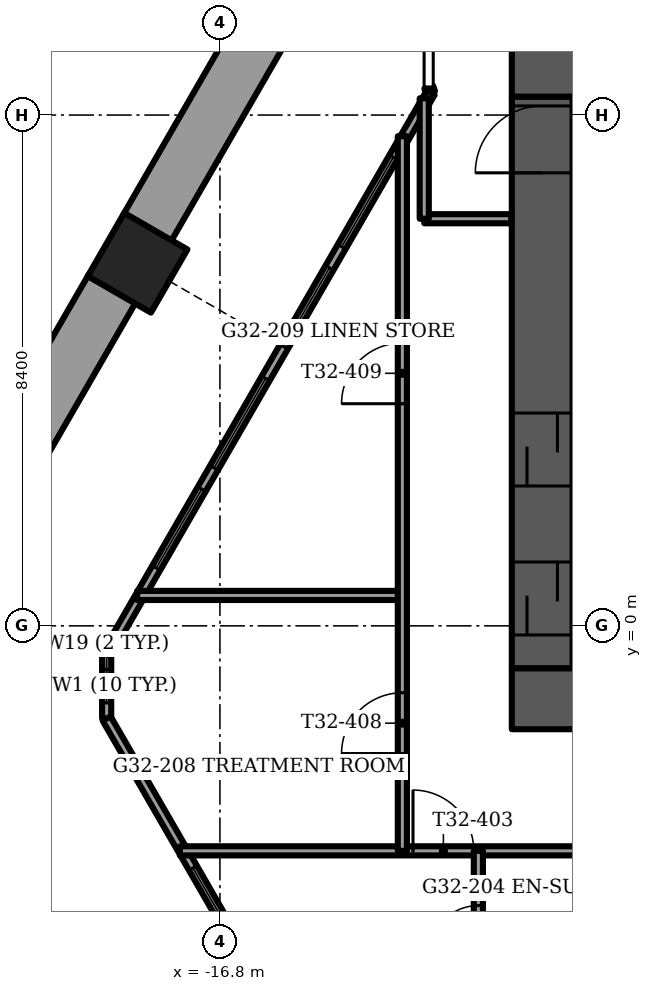
"""IFC4 building model, lengths in metres.
Left out: names, types, materials, properties, quantities, classifications, styles, units other than length and angle.
Written with IfcOpenShell. Run it as: python <this file> out.ifc"""

import sys

from ifc_helpers import new_model, si_unit, direction, frame, frame_2d, origin, origin_2d, place, context, subcontext, project, spatial, rectangle, extrude, element, fill, save


model = new_model("IFC4")
c1 = context("Model", 3, precision=1e-05, world=origin(), true_north=direction((0.0, 1.0)))
c2 = subcontext(c1, "Body", "Model", "MODEL_VIEW")
j1 = project(units=[si_unit("LENGTHUNIT", "METRE"), si_unit("PLANEANGLEUNIT", "RADIAN")], contexts=[c1])
p1 = place(None, origin())
s1 = spatial("IfcSite", under=j1, at=p1, CompositionType="ELEMENT")
p2 = place(p1, origin())
s2 = spatial("IfcBuilding", under=s1, at=p2, CompositionType="ELEMENT")
p3 = place(p2, frame((0.0, 0.0, 131.0)))
s3 = spatial("IfcBuildingStorey", under=s2, at=p3, CompositionType="ELEMENT", Elevation=131.0)
p4 = place(p3, frame((-18.154, 5.97, -1.2), z_axis=(0.0, 0.0, 1.0), x_axis=(0.5, 0.866025403784, 0.0)))
e1 = element("IfcColumn", 1, at=p4, inside=s3, PredefinedType="COLUMN", context=c2, shape_type="SweptSolid", body=[
    extrude(rectangle(XDim=1.2, YDim=1.2, at=origin_2d()), origin(), (0.0, 0.0, 1.0), 3.75),
])
p5 = place(p3, frame((-12.0, -1.2, -0.3), z_axis=(0.0, 0.0, 1.0), x_axis=(1.0, 0.0, 0.0)))
e2 = element("IfcWall", 2, at=p5, inside=s3, PredefinedType="SHEAR", context=c2, shape_type="SweptSolid", body=[
    extrude(rectangle(XDim=24.0, YDim=1.0, at=frame_2d((12.0, 0.0))), origin(), (0.0, 0.0, 1.0), 3.75),
])
p6 = place(p5, frame((11.2, 0.0, 0.0)))
e3 = element("IfcOpeningElement", 3, at=p6, cuts=e2, PredefinedType="OPENING", context=c2, shape_type="SweptSolid", body=[
    extrude(rectangle(XDim=1.6, YDim=2.1, at=frame_2d((0.8, 1.05))), frame((0.0, 0.5, 0.0), z_axis=(0.0, -1.0, 0.0), x_axis=(1.0, 0.0, 0.0)), (0.0, 0.0, 1.0), 1.0),
])
p7 = place(p3, frame((-12.0, 9.2, -0.3), z_axis=(0.0, 0.0, 1.0), x_axis=(1.0, 0.0, 0.0)))
e4 = element("IfcWall", 4, at=p7, inside=s3, PredefinedType="SHEAR", context=c2, shape_type="SweptSolid", body=[
    extrude(rectangle(XDim=24.0, YDim=1.0, at=frame_2d((12.0, 0.0))), origin(), (0.0, 0.0, 1.0), 3.75),
])
p8 = place(p7, frame((11.2, 0.0, 0.0)))
e5 = element("IfcOpeningElement", 5, at=p8, cuts=e4, PredefinedType="OPENING", context=c2, shape_type="SweptSolid", body=[
    extrude(rectangle(XDim=1.6, YDim=2.1, at=frame_2d((0.8, 1.05))), frame((0.0, 0.5, 0.0), z_axis=(0.0, -1.0, 0.0), x_axis=(1.0, 0.0, 0.0)), (0.0, 0.0, 1.0), 1.0),
])
p9 = place(p7, frame((5.25, 0.0, 0.0)))
e6 = element("IfcOpeningElement", 6, at=p9, cuts=e4, PredefinedType="OPENING", context=c2, shape_type="SweptSolid", body=[
    extrude(rectangle(XDim=1.1, YDim=2.1, at=frame_2d((0.55, 1.05))), frame((0.0, 0.5, 0.0), z_axis=(0.0, -1.0, 0.0), x_axis=(1.0, 0.0, 0.0)), (0.0, 0.0, 1.0), 1.0),
])
p10 = place(p7, frame((17.65, 0.0, 0.0)))
e7 = element("IfcOpeningElement", 7, at=p10, cuts=e4, PredefinedType="OPENING", context=c2, shape_type="SweptSolid", body=[
    extrude(rectangle(XDim=1.1, YDim=2.1, at=frame_2d((0.55, 1.05))), frame((0.0, 0.5, 0.0), z_axis=(0.0, -1.0, 0.0), x_axis=(1.0, 0.0, 0.0)), (0.0, 0.0, 1.0), 1.0),
])
p11 = place(p3, frame((-11.5, -0.7, -0.3), z_axis=(0.0, 0.0, 1.0), x_axis=(0.0, 1.0, 0.0)))
e8 = element("IfcWall", 8, at=p11, inside=s3, PredefinedType="SHEAR", context=c2, shape_type="SweptSolid", body=[
    extrude(rectangle(XDim=9.4, YDim=1.0, at=frame_2d((4.7, 0.0))), origin(), (0.0, 0.0, 1.0), 3.75),
])
p12 = place(p11, frame((8.15, 0.0, 0.0)))
e9 = element("IfcOpeningElement", 9, at=p12, cuts=e8, PredefinedType="OPENING", context=c2, shape_type="SweptSolid", body=[
    extrude(rectangle(XDim=1.1, YDim=2.1, at=frame_2d((0.55, 1.05))), frame((0.0, 0.5, 0.0), z_axis=(0.0, -1.0, 0.0), x_axis=(1.0, 0.0, 0.0)), (0.0, 0.0, 1.0), 1.0),
])
p13 = place(p11, frame((0.55, 0.0, 0.0)))
e10 = element("IfcOpeningElement", 10, at=p13, cuts=e8, PredefinedType="OPENING", context=c2, shape_type="SweptSolid", body=[
    extrude(rectangle(XDim=1.2, YDim=2.1, at=frame_2d((0.6, 1.05))), frame((0.0, 0.5, 0.0), z_axis=(0.0, -1.0, 0.0), x_axis=(1.0, 0.0, 0.0)), (0.0, 0.0, 1.0), 1.0),
])
p14 = place(p11, frame((3.0, 0.0, 0.0)))
e11 = element("IfcOpeningElement", 11, at=p14, cuts=e8, PredefinedType="OPENING", context=c2, shape_type="SweptSolid", body=[
    extrude(rectangle(XDim=1.2, YDim=2.1, at=frame_2d((0.6, 1.05))), frame((0.0, 0.5, 0.0), z_axis=(0.0, -1.0, 0.0), x_axis=(1.0, 0.0, 0.0)), (0.0, 0.0, 1.0), 1.0),
])
p15 = place(p3, frame((-14.662, 12.318, 0.0), z_axis=(0.0, 0.0, 1.0), x_axis=(-0.50001062018, -0.866019272134, 0.0)))
e12 = element("IfcWall", 12, at=p15, inside=s3, PredefinedType="PARAPET", context=c2, shape_type="SweptSolid", body=[
    extrude(rectangle(XDim=6.674, YDim=0.9, at=frame_2d((3.337, 0.0))), origin(), (0.0, 0.0, 1.0), 1.1),
])
p16 = place(p3, frame((-18.569, 5.552, 0.0), z_axis=(0.0, 0.0, 1.0), x_axis=(-0.500017246033, -0.866015446554, 0.0)))
e13 = element("IfcWall", 13, at=p16, inside=s3, PredefinedType="PARAPET", context=c2, shape_type="SweptSolid", body=[
    extrude(rectangle(XDim=6.906, YDim=0.9, at=frame_2d((3.453, 0.0))), origin(), (0.0, 0.0, 1.0), 1.1),
])
p17 = place(p3, frame((-22.022, -1.556, 0.0), z_axis=(0.0, 0.0, 1.0), x_axis=(0.499996813733, -0.866027243369, 0.0)))
e14 = element("IfcWall", 14, at=p17, inside=s3, PredefinedType="PARAPET", context=c2, shape_type="SweptSolid", body=[
    extrude(rectangle(XDim=5.187, YDim=0.9, at=frame_2d((2.593, 0.0))), origin(), (0.0, 0.0, 1.0), 1.1),
])
p18 = place(p3, frame((-13.334, 8.769, 0.0), z_axis=(0.0, 0.0, 1.0), x_axis=(-0.499997430087, -0.866026887519, 0.0)))
e15 = element("IfcWall", 15, at=p18, inside=s3, PredefinedType="SOLIDWALL", context=c2, shape_type="SweptSolid", body=[
    extrude(rectangle(XDim=10.657, YDim=0.15, at=frame_2d((5.329, 0.0))), origin(), (0.0, 0.0, 1.0), 3.45),
])
p19 = place(p18, frame((1.228, 0.0, 0.15)))
e16 = element("IfcOpeningElement", 16, at=p19, cuts=e15, PredefinedType="OPENING", context=c2, shape_type="SweptSolid", body=[
    extrude(rectangle(XDim=1.7, YDim=2.2, at=frame_2d((0.85, 1.1))), frame((0.0, 0.075, 0.0), z_axis=(0.0, -1.0, 0.0), x_axis=(1.0, 0.0, 0.0)), (0.0, 0.0, 1.0), 0.15),
])
p20 = place(p18, frame((3.327, 0.0, 0.15)))
e17 = element("IfcOpeningElement", 17, at=p20, cuts=e15, PredefinedType="OPENING", context=c2, shape_type="SweptSolid", body=[
    extrude(rectangle(XDim=1.5, YDim=2.2, at=frame_2d((0.75, 1.1))), frame((0.0, 0.075, 0.0), z_axis=(0.0, -1.0, 0.0), x_axis=(1.0, 0.0, 0.0)), (0.0, 0.0, 1.0), 0.15),
])
p21 = place(p18, frame((5.427, 0.0, 0.15)))
e18 = element("IfcOpeningElement", 18, at=p21, cuts=e15, PredefinedType="OPENING", context=c2, shape_type="SweptSolid", body=[
    extrude(rectangle(XDim=1.7, YDim=2.2, at=frame_2d((0.85, 1.1))), frame((0.0, 0.075, 0.0), z_axis=(0.0, -1.0, 0.0), x_axis=(1.0, 0.0, 0.0)), (0.0, 0.0, 1.0), 0.15),
])
p22 = place(p18, frame((7.528, 0.0, 0.15)))
e19 = element("IfcOpeningElement", 19, at=p22, cuts=e15, PredefinedType="OPENING", context=c2, shape_type="SweptSolid", body=[
    extrude(rectangle(XDim=1.5, YDim=2.2, at=frame_2d((0.75, 1.1))), frame((0.0, 0.075, 0.0), z_axis=(0.0, -1.0, 0.0), x_axis=(1.0, 0.0, 0.0)), (0.0, 0.0, 1.0), 0.15),
])
p23 = place(p3, frame((-18.663, -1.525, 0.0), z_axis=(0.0, 0.0, 1.0), x_axis=(0.499997430087, -0.866026887519, 0.0)))
e20 = element("IfcWall", 20, at=p23, inside=s3, PredefinedType="SOLIDWALL", context=c2, shape_type="SweptSolid", body=[
    extrude(rectangle(XDim=10.657, YDim=0.15, at=frame_2d((5.329, 0.0))), origin(), (0.0, 0.0, 1.0), 3.45),
])
p24 = place(p23, frame((2.835, 0.0, 0.15)))
e21 = element("IfcOpeningElement", 21, at=p24, cuts=e20, PredefinedType="OPENING", context=c2, shape_type="SweptSolid", body=[
    extrude(rectangle(XDim=1.7, YDim=2.2, at=frame_2d((0.85, 1.1))), frame((0.0, 0.075, 0.0), z_axis=(0.0, -1.0, 0.0), x_axis=(1.0, 0.0, 0.0)), (0.0, 0.0, 1.0), 0.15),
])
p25 = place(p23, frame((8.573, 0.0, 0.15)))
e22 = element("IfcOpeningElement", 22, at=p25, cuts=e20, PredefinedType="OPENING", context=c2, shape_type="SweptSolid", body=[
    extrude(rectangle(XDim=0.9, YDim=2.2, at=frame_2d((0.45, 1.1))), frame((0.0, 0.075, 0.0), z_axis=(0.0, -1.0, 0.0), x_axis=(1.0, 0.0, 0.0)), (0.0, 0.0, 1.0), 0.15),
])
p26 = place(p23, frame((7.023, 0.0, 0.0)))
e23 = element("IfcOpeningElement", 23, at=p26, cuts=e20, PredefinedType="OPENING", context=c2, shape_type="SweptSolid", body=[
    extrude(rectangle(XDim=1.5, YDim=2.4, at=frame_2d((0.75, 1.2))), frame((0.0, 0.075, 0.0), z_axis=(0.0, -1.0, 0.0), x_axis=(1.0, 0.0, 0.0)), (0.0, 0.0, 1.0), 0.15),
])
p27 = place(p3, frame((-18.663, -0.46, 0.0), z_axis=(0.0, 0.0, 1.0), x_axis=(0.0, -1.0, 0.0)))
e24 = element("IfcWall", 24, at=p27, inside=s3, PredefinedType="SOLIDWALL", context=c2, shape_type="SweptSolid", body=[
    extrude(rectangle(XDim=1.065, YDim=0.15, at=frame_2d((0.533, 0.0))), origin(), (0.0, 0.0, 1.0), 3.45),
])
p28 = place(p27, frame((0.258, 0.0, 0.15)))
e25 = element("IfcOpeningElement", 25, at=p28, cuts=e24, PredefinedType="OPENING", context=c2, shape_type="SweptSolid", body=[
    extrude(rectangle(XDim=0.55, YDim=2.2, at=frame_2d((0.275, 1.1))), frame((0.0, 0.075, 0.0), z_axis=(0.0, -1.0, 0.0), x_axis=(1.0, 0.0, 0.0)), (0.0, 0.0, 1.0), 0.15),
])
p29 = place(p3, frame((-13.334, 8.769, 0.0), z_axis=(0.0, 0.0, 1.0), x_axis=(-0.337751931921, 0.941235163221, 0.0)))
e26 = element("IfcWall", 26, at=p29, inside=s3, PredefinedType="SOLIDWALL", context=c2, shape_type="SweptSolid", body=[
    extrude(rectangle(XDim=0.098, YDim=0.15, at=frame_2d((0.049, 0.0))), origin(), (0.0, 0.0, 1.0), 3.45),
])
p30 = place(p3, frame((-17.459, -3.7, 0.0), z_axis=(0.0, 0.0, 1.0), x_axis=(1.0, 0.0, 0.0)))
e27 = element("IfcWall", 27, at=p30, inside=s3, PredefinedType="PARTITIONING", context=c2, shape_type="SweptSolid", body=[
    extrude(rectangle(XDim=8.299, YDim=0.15, at=frame_2d((4.149, 0.0))), origin(), (0.0, 0.0, 1.0), 3.45),
])
p31 = place(p30, frame((3.834, 0.0, 0.0)))
e28 = element("IfcOpeningElement", 28, at=p31, cuts=e27, PredefinedType="OPENING", context=c2, shape_type="SweptSolid", body=[
    extrude(rectangle(XDim=1.0, YDim=2.1, at=frame_2d((0.5, 1.05))), frame((0.0, 0.075, 0.0), z_axis=(0.0, -1.0, 0.0), x_axis=(1.0, 0.0, 0.0)), (0.0, 0.0, 1.0), 0.15),
])
p32 = place(p3, frame((-18.16, 0.5, 0.0), z_axis=(0.0, 0.0, 1.0), x_axis=(1.0, 0.0, 0.0)))
e29 = element("IfcWall", 29, at=p32, inside=s3, PredefinedType="PARTITIONING", context=c2, shape_type="SweptSolid", body=[
    extrude(rectangle(XDim=4.36, YDim=0.15, at=frame_2d((2.18, 0.0))), origin(), (0.0, 0.0, 1.0), 3.45),
])
p33 = place(p3, frame((-13.44, 6.695, 0.0), z_axis=(0.0, 0.0, 1.0), x_axis=(1.0, 0.0, 0.0)))
e30 = element("IfcWall", 30, at=p33, inside=s3, PredefinedType="PARTITIONING", context=c2, shape_type="SweptSolid", body=[
    extrude(rectangle(XDim=1.43, YDim=0.15, at=frame_2d((0.715, 0.0))), origin(), (0.0, 0.0, 1.0), 3.45),
])
p34 = place(p3, frame((-12.55, -6.3, 0.0), z_axis=(0.0, 0.0, 1.0), x_axis=(0.0, 1.0, 0.0)))
e31 = element("IfcWall", 31, at=p34, inside=s3, PredefinedType="PARTITIONING", context=c2, shape_type="SweptSolid", body=[
    extrude(rectangle(XDim=2.6, YDim=0.15, at=frame_2d((1.3, 0.0))), origin(), (0.0, 0.0, 1.0), 3.45),
])
p35 = place(p34, frame((0.9, 0.0, 0.0)))
e32 = element("IfcOpeningElement", 32, at=p35, cuts=e31, PredefinedType="OPENING", context=c2, shape_type="SweptSolid", body=[
    extrude(rectangle(XDim=0.8, YDim=2.1, at=frame_2d((0.4, 1.05))), frame((0.0, 0.075, 0.0), z_axis=(0.0, -1.0, 0.0), x_axis=(1.0, 0.0, 0.0)), (0.0, 0.0, 1.0), 0.15),
])
p36 = place(p3, frame((-13.44, 6.695, 0.0), z_axis=(0.0, 0.0, 1.0), x_axis=(0.0, 1.0, 0.0)))
e33 = element("IfcWall", 33, at=p36, inside=s3, PredefinedType="PARTITIONING", context=c2, shape_type="SweptSolid", body=[
    extrude(rectangle(XDim=1.981, YDim=0.15, at=frame_2d((0.99, 0.0))), origin(), (0.0, 0.0, 1.0), 3.45),
])
p37 = place(p3, frame((-13.8, -3.7, 0.0), z_axis=(0.0, 0.0, 1.0), x_axis=(0.0, 1.0, 0.0)))
e34 = element("IfcWall", 34, at=p37, inside=s3, PredefinedType="PARTITIONING", context=c2, shape_type="SweptSolid", body=[
    extrude(rectangle(XDim=11.752, YDim=0.15, at=frame_2d((5.876, 0.0))), origin(), (0.0, 0.0, 1.0), 3.45),
])
p38 = place(p37, frame((1.6, 0.0, 0.0)))
e35 = element("IfcOpeningElement", 35, at=p38, cuts=e34, PredefinedType="OPENING", context=c2, shape_type="SweptSolid", body=[
    extrude(rectangle(XDim=1.0, YDim=2.1, at=frame_2d((0.5, 1.05))), frame((0.0, 0.075, 0.0), z_axis=(0.0, -1.0, 0.0), x_axis=(1.0, 0.0, 0.0)), (0.0, 0.0, 1.0), 0.15),
])
p39 = place(p37, frame((7.353, 0.0, 0.0)))
e36 = element("IfcOpeningElement", 36, at=p39, cuts=e34, PredefinedType="OPENING", context=c2, shape_type="SweptSolid", body=[
    extrude(rectangle(XDim=1.0, YDim=2.1, at=frame_2d((0.5, 1.05))), frame((0.0, 0.075, 0.0), z_axis=(0.0, -1.0, 0.0), x_axis=(1.0, 0.0, 0.0)), (0.0, 0.0, 1.0), 0.15),
])
p40 = place(p19, origin())
e37 = element("IfcWindow", 37, at=p40, inside=s3, PartitioningType="SINGLE_PANEL", PredefinedType="WINDOW", context=c2, shape_type="SweptSolid", body=[
    extrude(rectangle(XDim=1.7, YDim=2.2, at=frame_2d((0.85, 1.1))), frame((0.0, 0.03, 0.0), z_axis=(0.0, -1.0, 0.0), x_axis=(1.0, 0.0, 0.0)), (0.0, 0.0, 1.0), 0.06),
])
fill(e16, e37)
p41 = place(p20, origin())
e38 = element("IfcWindow", 38, at=p41, inside=s3, PartitioningType="SINGLE_PANEL", PredefinedType="WINDOW", context=c2, shape_type="SweptSolid", body=[
    extrude(rectangle(XDim=1.5, YDim=2.2, at=frame_2d((0.75, 1.1))), frame((0.0, 0.03, 0.0), z_axis=(0.0, -1.0, 0.0), x_axis=(1.0, 0.0, 0.0)), (0.0, 0.0, 1.0), 0.06),
])
fill(e17, e38)
p42 = place(p21, origin())
e39 = element("IfcWindow", 39, at=p42, inside=s3, PartitioningType="SINGLE_PANEL", PredefinedType="WINDOW", context=c2, shape_type="SweptSolid", body=[
    extrude(rectangle(XDim=1.7, YDim=2.2, at=frame_2d((0.85, 1.1))), frame((0.0, 0.03, 0.0), z_axis=(0.0, -1.0, 0.0), x_axis=(1.0, 0.0, 0.0)), (0.0, 0.0, 1.0), 0.06),
])
fill(e18, e39)
p43 = place(p22, origin())
e40 = element("IfcWindow", 40, at=p43, inside=s3, PartitioningType="SINGLE_PANEL", PredefinedType="WINDOW", context=c2, shape_type="SweptSolid", body=[
    extrude(rectangle(XDim=1.5, YDim=2.2, at=frame_2d((0.75, 1.1))), frame((0.0, 0.03, 0.0), z_axis=(0.0, -1.0, 0.0), x_axis=(1.0, 0.0, 0.0)), (0.0, 0.0, 1.0), 0.06),
])
fill(e19, e40)
p44 = place(p24, origin())
e41 = element("IfcWindow", 41, at=p44, inside=s3, PartitioningType="SINGLE_PANEL", PredefinedType="WINDOW", context=c2, shape_type="SweptSolid", body=[
    extrude(rectangle(XDim=1.7, YDim=2.2, at=frame_2d((0.85, 1.1))), frame((0.0, 0.03, 0.0), z_axis=(0.0, -1.0, 0.0), x_axis=(1.0, 0.0, 0.0)), (0.0, 0.0, 1.0), 0.06),
])
fill(e21, e41)
p45 = place(p28, origin())
e42 = element("IfcWindow", 42, at=p45, inside=s3, PartitioningType="SINGLE_PANEL", PredefinedType="WINDOW", context=c2, shape_type="SweptSolid", body=[
    extrude(rectangle(XDim=0.55, YDim=2.2, at=frame_2d((0.275, 1.1))), frame((0.0, 0.03, 0.0), z_axis=(0.0, -1.0, 0.0), x_axis=(1.0, 0.0, 0.0)), (0.0, 0.0, 1.0), 0.06),
])
fill(e25, e42)
p46 = place(p12, origin())
e43 = element("IfcDoor", 43, at=p46, inside=s3, OperationType="SINGLE_SWING_LEFT", PredefinedType="DOOR", context=c2, shape_type="SweptSolid", body=[
    extrude(rectangle(XDim=1.1, YDim=2.1, at=frame_2d((0.55, 1.05))), frame((0.0, 0.025, 0.0), z_axis=(0.0, -1.0, 0.0), x_axis=(1.0, 0.0, 0.0)), (0.0, 0.0, 1.0), 0.05),
])
fill(e9, e43)
p47 = place(p13, origin())
e44 = element("IfcDoor", 44, at=p47, inside=s3, OperationType="SLIDING_TO_LEFT", PredefinedType="DOOR", context=c2, shape_type="SweptSolid", body=[
    extrude(rectangle(XDim=1.2, YDim=2.1, at=frame_2d((0.6, 1.05))), frame((0.0, 0.025, 0.0), z_axis=(0.0, -1.0, 0.0), x_axis=(1.0, 0.0, 0.0)), (0.0, 0.0, 1.0), 0.05),
])
fill(e10, e44)
p48 = place(p14, origin())
e45 = element("IfcDoor", 45, at=p48, inside=s3, OperationType="SLIDING_TO_LEFT", PredefinedType="DOOR", context=c2, shape_type="SweptSolid", body=[
    extrude(rectangle(XDim=1.2, YDim=2.1, at=frame_2d((0.6, 1.05))), frame((0.0, 0.025, 0.0), z_axis=(0.0, -1.0, 0.0), x_axis=(1.0, 0.0, 0.0)), (0.0, 0.0, 1.0), 0.05),
])
fill(e11, e45)
p49 = place(p31, origin())
e46 = element("IfcDoor", 46, at=p49, inside=s3, OperationType="SINGLE_SWING_LEFT", PredefinedType="DOOR", context=c2, shape_type="SweptSolid", body=[
    extrude(rectangle(XDim=1.0, YDim=2.1, at=frame_2d((0.5, 1.05))), frame((0.0, 0.025, 0.0), z_axis=(0.0, -1.0, 0.0), x_axis=(1.0, 0.0, 0.0)), (0.0, 0.0, 1.0), 0.05),
])
fill(e28, e46)
p50 = place(p35, origin())
e47 = element("IfcDoor", 47, at=p50, inside=s3, OperationType="SINGLE_SWING_RIGHT", PredefinedType="DOOR", context=c2, shape_type="SweptSolid", body=[
    extrude(rectangle(XDim=0.8, YDim=2.1, at=frame_2d((0.4, 1.05))), frame((0.0, 0.025, 0.0), z_axis=(0.0, -1.0, 0.0), x_axis=(1.0, 0.0, 0.0)), (0.0, 0.0, 1.0), 0.05),
])
fill(e32, e47)
p51 = place(p38, origin())
e48 = element("IfcDoor", 48, at=p51, inside=s3, OperationType="SINGLE_SWING_RIGHT", PredefinedType="DOOR", context=c2, shape_type="SweptSolid", body=[
    extrude(rectangle(XDim=1.0, YDim=2.1, at=frame_2d((0.5, 1.05))), frame((0.0, 0.025, 0.0), z_axis=(0.0, -1.0, 0.0), x_axis=(1.0, 0.0, 0.0)), (0.0, 0.0, 1.0), 0.05),
])
fill(e35, e48)
p52 = place(p39, origin())
e49 = element("IfcDoor", 49, at=p52, inside=s3, OperationType="SINGLE_SWING_LEFT", PredefinedType="DOOR", context=c2, shape_type="SweptSolid", body=[
    extrude(rectangle(XDim=1.0, YDim=2.1, at=frame_2d((0.5, 1.05))), frame((0.0, 0.025, 0.0), z_axis=(0.0, -1.0, 0.0), x_axis=(1.0, 0.0, 0.0)), (0.0, 0.0, 1.0), 0.05),
])
fill(e36, e49)
save(model, sys.argv[1])
